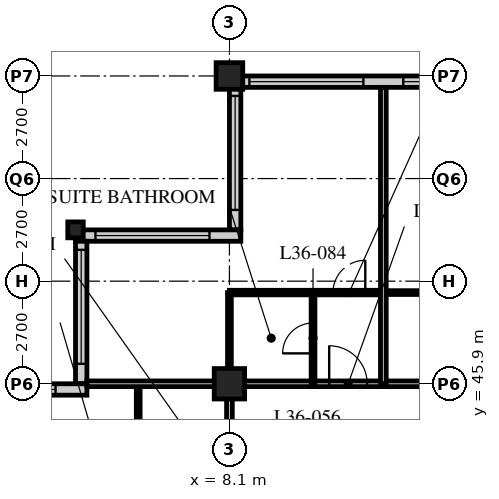
"""IFC4 building model, lengths in metres.
Left out: names, types, materials, properties, quantities, classifications, styles, units other than length and angle.
Written with IfcOpenShell. Run it as: python <this file> out.ifc"""

import sys

from ifc_helpers import new_model, si_unit, direction, frame, frame_2d, origin, origin_2d, place, context, subcontext, project, spatial, rectangle, hollow_rectangle, i_section, extrude, element, fill, save


model = new_model("IFC4")
c1 = context("Model", 3, precision=1e-05, world=origin(), true_north=direction((0.0, 1.0)))
c2 = subcontext(c1, "Body", "Model", "MODEL_VIEW")
j1 = project(units=[si_unit("LENGTHUNIT", "METRE"), si_unit("PLANEANGLEUNIT", "RADIAN")], contexts=[c1])
p1 = place(None, origin())
s1 = spatial("IfcSite", under=j1, at=p1, CompositionType="ELEMENT")
p2 = place(p1, origin())
s2 = spatial("IfcBuilding", under=s1, at=p2, CompositionType="ELEMENT")
p3 = place(p2, frame((0.0, 0.0, 140.8)))
s3 = spatial("IfcBuildingStorey", under=s2, at=p3, CompositionType="ELEMENT", Elevation=140.8)
p4 = place(p3, frame((4.05, 49.95, 0.0), z_axis=(0.0, 0.0, 1.0), x_axis=(1.0, 0.0, 0.0)))
e1 = element("IfcColumn", 1, at=p4, inside=s3, PredefinedType="COLUMN", context=c2, shape_type="SweptSolid", body=[
    extrude(i_section(OverallWidth=0.407, OverallDepth=0.419, WebThickness=0.031, FlangeThickness=0.049, FilletRadius=0.015, at=origin_2d()), origin(), (0.0, 0.0, 1.0), 3.4),
])
p5 = place(p3, frame((8.1, 45.9, 0.0), z_axis=(0.0, 0.0, 1.0), x_axis=(1.0, 0.0, 0.0)))
e2 = element("IfcColumn", 2, at=p5, inside=s3, PredefinedType="COLUMN", context=c2, shape_type="SweptSolid", body=[
    extrude(hollow_rectangle(XDim=0.8, YDim=0.8, WallThickness=0.08, at=origin_2d()), origin(), (0.0, 0.0, 1.0), 3.4),
])
p6 = place(p3, frame((8.1, 54.0, 0.0), z_axis=(0.0, 0.0, 1.0), x_axis=(1.0, 0.0, 0.0)))
e3 = element("IfcColumn", 3, at=p6, inside=s3, PredefinedType="COLUMN", context=c2, shape_type="SweptSolid", body=[
    extrude(hollow_rectangle(XDim=0.7, YDim=0.7, WallThickness=0.07, at=origin_2d()), origin(), (0.0, 0.0, 1.0), 3.4),
])
p7 = place(p3, frame((48.3, 53.85, 0.0), z_axis=(0.0, 0.0, 1.0), x_axis=(-1.0, 0.0, 0.0)))
e4 = element("IfcWall", 4, at=p7, inside=s3, PredefinedType="SOLIDWALL", context=c2, shape_type="SweptSolid", body=[
    extrude(rectangle(XDim=40.2, YDim=0.3, at=frame_2d((20.1, 0.0))), origin(), (0.0, 0.0, 1.0), 3.19),
])
p8 = place(p7, frame((0.225, 0.0, 0.9)))
e5 = element("IfcOpeningElement", 5, at=p8, cuts=e4, PredefinedType="OPENING", context=c2, shape_type="SweptSolid", body=[
    extrude(rectangle(XDim=3.0, YDim=2.0, at=frame_2d((1.5, 1.0))), frame((0.0, 0.16, 0.0), z_axis=(0.0, -1.0, 0.0), x_axis=(1.0, 0.0, 0.0)), (0.0, 0.0, 1.0), 0.32),
])
p9 = place(p7, frame((4.275, 0.0, 0.9)))
e6 = element("IfcOpeningElement", 6, at=p9, cuts=e4, PredefinedType="OPENING", context=c2, shape_type="SweptSolid", body=[
    extrude(rectangle(XDim=3.0, YDim=2.0, at=frame_2d((1.5, 1.0))), frame((0.0, 0.16, 0.0), z_axis=(0.0, -1.0, 0.0), x_axis=(1.0, 0.0, 0.0)), (0.0, 0.0, 1.0), 0.32),
])
p10 = place(p7, frame((8.325, 0.0, 0.9)))
e7 = element("IfcOpeningElement", 7, at=p10, cuts=e4, PredefinedType="OPENING", context=c2, shape_type="SweptSolid", body=[
    extrude(rectangle(XDim=3.0, YDim=2.0, at=frame_2d((1.5, 1.0))), frame((0.0, 0.16, 0.0), z_axis=(0.0, -1.0, 0.0), x_axis=(1.0, 0.0, 0.0)), (0.0, 0.0, 1.0), 0.32),
])
p11 = place(p7, frame((12.375, 0.0, 0.9)))
e8 = element("IfcOpeningElement", 8, at=p11, cuts=e4, PredefinedType="OPENING", context=c2, shape_type="SweptSolid", body=[
    extrude(rectangle(XDim=3.0, YDim=2.0, at=frame_2d((1.5, 1.0))), frame((0.0, 0.16, 0.0), z_axis=(0.0, -1.0, 0.0), x_axis=(1.0, 0.0, 0.0)), (0.0, 0.0, 1.0), 0.32),
])
p12 = place(p7, frame((16.425, 0.0, 0.9)))
e9 = element("IfcOpeningElement", 9, at=p12, cuts=e4, PredefinedType="OPENING", context=c2, shape_type="SweptSolid", body=[
    extrude(rectangle(XDim=3.0, YDim=2.0, at=frame_2d((1.5, 1.0))), frame((0.0, 0.16, 0.0), z_axis=(0.0, -1.0, 0.0), x_axis=(1.0, 0.0, 0.0)), (0.0, 0.0, 1.0), 0.32),
])
p13 = place(p7, frame((20.475, 0.0, 0.9)))
e10 = element("IfcOpeningElement", 10, at=p13, cuts=e4, PredefinedType="OPENING", context=c2, shape_type="SweptSolid", body=[
    extrude(rectangle(XDim=3.0, YDim=2.0, at=frame_2d((1.5, 1.0))), frame((0.0, 0.16, 0.0), z_axis=(0.0, -1.0, 0.0), x_axis=(1.0, 0.0, 0.0)), (0.0, 0.0, 1.0), 0.32),
])
p14 = place(p7, frame((24.525, 0.0, 0.9)))
e11 = element("IfcOpeningElement", 11, at=p14, cuts=e4, PredefinedType="OPENING", context=c2, shape_type="SweptSolid", body=[
    extrude(rectangle(XDim=3.0, YDim=2.0, at=frame_2d((1.5, 1.0))), frame((0.0, 0.16, 0.0), z_axis=(0.0, -1.0, 0.0), x_axis=(1.0, 0.0, 0.0)), (0.0, 0.0, 1.0), 0.32),
])
p15 = place(p7, frame((28.575, 0.0, 0.9)))
e12 = element("IfcOpeningElement", 12, at=p15, cuts=e4, PredefinedType="OPENING", context=c2, shape_type="SweptSolid", body=[
    extrude(rectangle(XDim=3.0, YDim=2.0, at=frame_2d((1.5, 1.0))), frame((0.0, 0.16, 0.0), z_axis=(0.0, -1.0, 0.0), x_axis=(1.0, 0.0, 0.0)), (0.0, 0.0, 1.0), 0.32),
])
p16 = place(p7, frame((32.625, 0.0, 0.9)))
e13 = element("IfcOpeningElement", 13, at=p16, cuts=e4, PredefinedType="OPENING", context=c2, shape_type="SweptSolid", body=[
    extrude(rectangle(XDim=3.0, YDim=2.0, at=frame_2d((1.5, 1.0))), frame((0.0, 0.16, 0.0), z_axis=(0.0, -1.0, 0.0), x_axis=(1.0, 0.0, 0.0)), (0.0, 0.0, 1.0), 0.32),
])
p17 = place(p7, frame((36.675, 0.0, 0.9)))
e14 = element("IfcOpeningElement", 14, at=p17, cuts=e4, PredefinedType="OPENING", context=c2, shape_type="SweptSolid", body=[
    extrude(rectangle(XDim=3.0, YDim=2.0, at=frame_2d((1.5, 1.0))), frame((0.0, 0.16, 0.0), z_axis=(0.0, -1.0, 0.0), x_axis=(1.0, 0.0, 0.0)), (0.0, 0.0, 1.0), 0.32),
])
p18 = place(p3, frame((8.25, 53.7, 0.0), z_axis=(0.0, 0.0, 1.0), x_axis=(0.0, -1.0, 0.0)))
e15 = element("IfcWall", 15, at=p18, inside=s3, PredefinedType="SOLIDWALL", context=c2, shape_type="SweptSolid", body=[
    extrude(rectangle(XDim=3.75, YDim=0.3, at=frame_2d((1.875, 0.0))), origin(), (0.0, 0.0, 1.0), 3.19),
])
p19 = place(p18, frame((0.225, 0.0, 0.9)))
e16 = element("IfcOpeningElement", 16, at=p19, cuts=e15, PredefinedType="OPENING", context=c2, shape_type="SweptSolid", body=[
    extrude(rectangle(XDim=3.0, YDim=1.5, at=frame_2d((1.5, 0.75))), frame((0.0, 0.16, 0.0), z_axis=(0.0, -1.0, 0.0), x_axis=(1.0, 0.0, 0.0)), (0.0, 0.0, 1.0), 0.32),
])
p20 = place(p3, frame((8.4, 49.8, 0.0), z_axis=(0.0, 0.0, 1.0), x_axis=(-1.0, 0.0, 0.0)))
e17 = element("IfcWall", 17, at=p20, inside=s3, PredefinedType="SOLIDWALL", context=c2, shape_type="SweptSolid", body=[
    extrude(rectangle(XDim=4.35, YDim=0.3, at=frame_2d((2.175, 0.0))), origin(), (0.0, 0.0, 1.0), 3.19),
])
p21 = place(p20, frame((0.825, 0.0, 0.9)))
e18 = element("IfcOpeningElement", 18, at=p21, cuts=e17, PredefinedType="OPENING", context=c2, shape_type="SweptSolid", body=[
    extrude(rectangle(XDim=3.0, YDim=1.5, at=frame_2d((1.5, 0.75))), frame((0.0, 0.16, 0.0), z_axis=(0.0, -1.0, 0.0), x_axis=(1.0, 0.0, 0.0)), (0.0, 0.0, 1.0), 0.32),
])
p22 = place(p3, frame((4.2, 49.65, 0.0), z_axis=(0.0, 0.0, 1.0), x_axis=(0.0, -1.0, 0.0)))
e19 = element("IfcWall", 19, at=p22, inside=s3, PredefinedType="SOLIDWALL", context=c2, shape_type="SweptSolid", body=[
    extrude(rectangle(XDim=3.75, YDim=0.3, at=frame_2d((1.875, 0.0))), origin(), (0.0, 0.0, 1.0), 3.19),
])
p23 = place(p22, frame((0.225, 0.0, 0.9)))
e20 = element("IfcOpeningElement", 20, at=p23, cuts=e19, PredefinedType="OPENING", context=c2, shape_type="SweptSolid", body=[
    extrude(rectangle(XDim=3.0, YDim=1.5, at=frame_2d((1.5, 0.75))), frame((0.0, 0.16, 0.0), z_axis=(0.0, -1.0, 0.0), x_axis=(1.0, 0.0, 0.0)), (0.0, 0.0, 1.0), 0.32),
])
p24 = place(p3, frame((4.35, 45.75, 0.0), z_axis=(0.0, 0.0, 1.0), x_axis=(-1.0, 0.0, 0.0)))
e21 = element("IfcWall", 21, at=p24, inside=s3, PredefinedType="SOLIDWALL", context=c2, shape_type="SweptSolid", body=[
    extrude(rectangle(XDim=4.35, YDim=0.3, at=frame_2d((2.175, 0.0))), origin(), (0.0, 0.0, 1.0), 3.19),
])
p25 = place(p24, frame((0.825, 0.0, 0.9)))
e22 = element("IfcOpeningElement", 22, at=p25, cuts=e21, PredefinedType="OPENING", context=c2, shape_type="SweptSolid", body=[
    extrude(rectangle(XDim=3.0, YDim=1.5, at=frame_2d((1.5, 0.75))), frame((0.0, 0.16, 0.0), z_axis=(0.0, -1.0, 0.0), x_axis=(1.0, 0.0, 0.0)), (0.0, 0.0, 1.0), 0.32),
])
p26 = place(p3, frame((8.1, 45.9, 0.0), z_axis=(0.0, 0.0, 1.0), x_axis=(1.0, 0.0, 0.0)))
e23 = element("IfcWall", 23, at=p26, inside=s3, PredefinedType="PARTITIONING", context=c2, shape_type="SweptSolid", body=[
    extrude(rectangle(XDim=36.45, YDim=0.15, at=frame_2d((18.225, 0.0))), origin(), (0.0, 0.0, 1.0), 2.578),
])
p27 = place(p26, frame((9.625, 0.0, 0.0)))
e24 = element("IfcOpeningElement", 24, at=p27, cuts=e23, PredefinedType="OPENING", context=c2, shape_type="SweptSolid", body=[
    extrude(rectangle(XDim=1.0, YDim=2.1, at=frame_2d((0.5, 1.05))), frame((0.0, 0.085, 0.0), z_axis=(0.0, -1.0, 0.0), x_axis=(1.0, 0.0, 0.0)), (0.0, 0.0, 1.0), 0.17),
])
p28 = place(p26, frame((21.775, 0.0, 0.0)))
e25 = element("IfcOpeningElement", 25, at=p28, cuts=e23, PredefinedType="OPENING", context=c2, shape_type="SweptSolid", body=[
    extrude(rectangle(XDim=1.0, YDim=2.1, at=frame_2d((0.5, 1.05))), frame((0.0, 0.085, 0.0), z_axis=(0.0, -1.0, 0.0), x_axis=(1.0, 0.0, 0.0)), (0.0, 0.0, 1.0), 0.17),
])
p29 = place(p26, frame((28.95, 0.0, 0.0)))
e26 = element("IfcOpeningElement", 26, at=p29, cuts=e23, PredefinedType="OPENING", context=c2, shape_type="SweptSolid", body=[
    extrude(rectangle(XDim=1.0, YDim=2.1, at=frame_2d((0.5, 1.05))), frame((0.0, 0.085, 0.0), z_axis=(0.0, -1.0, 0.0), x_axis=(1.0, 0.0, 0.0)), (0.0, 0.0, 1.0), 0.17),
])
p30 = place(p26, frame((33.925, 0.0, 0.0)))
e27 = element("IfcOpeningElement", 27, at=p30, cuts=e23, PredefinedType="OPENING", context=c2, shape_type="SweptSolid", body=[
    extrude(rectangle(XDim=1.0, YDim=2.1, at=frame_2d((0.5, 1.05))), frame((0.0, 0.085, 0.0), z_axis=(0.0, -1.0, 0.0), x_axis=(1.0, 0.0, 0.0)), (0.0, 0.0, 1.0), 0.17),
])
p31 = place(p26, frame((2.625, 0.0, 0.0)))
e28 = element("IfcOpeningElement", 28, at=p31, cuts=e23, PredefinedType="OPENING", context=c2, shape_type="SweptSolid", body=[
    extrude(rectangle(XDim=1.0, YDim=2.1, at=frame_2d((0.5, 1.05))), frame((0.0, 0.085, 0.0), z_axis=(0.0, -1.0, 0.0), x_axis=(1.0, 0.0, 0.0)), (0.0, 0.0, 1.0), 0.17),
])
p32 = place(p3, frame((8.1, 17.55, 0.0), z_axis=(0.0, 0.0, 1.0), x_axis=(0.0, 1.0, 0.0)))
e29 = element("IfcWall", 29, at=p32, inside=s3, PredefinedType="PARTITIONING", context=c2, shape_type="SweptSolid", body=[
    extrude(rectangle(XDim=28.35, YDim=0.15, at=frame_2d((14.175, 0.0))), origin(), (0.0, 0.0, 1.0), 2.578),
])
p33 = place(p32, frame((1.9, 0.0, 0.0)))
e30 = element("IfcOpeningElement", 30, at=p33, cuts=e29, PredefinedType="OPENING", context=c2, shape_type="SweptSolid", body=[
    extrude(rectangle(XDim=1.0, YDim=2.1, at=frame_2d((0.5, 1.05))), frame((0.0, 0.085, 0.0), z_axis=(0.0, -1.0, 0.0), x_axis=(1.0, 0.0, 0.0)), (0.0, 0.0, 1.0), 0.17),
])
p34 = place(p32, frame((10.0, 0.0, 0.0)))
e31 = element("IfcOpeningElement", 31, at=p34, cuts=e29, PredefinedType="OPENING", context=c2, shape_type="SweptSolid", body=[
    extrude(rectangle(XDim=1.0, YDim=2.1, at=frame_2d((0.5, 1.05))), frame((0.0, 0.085, 0.0), z_axis=(0.0, -1.0, 0.0), x_axis=(1.0, 0.0, 0.0)), (0.0, 0.0, 1.0), 0.17),
])
p35 = place(p32, frame((18.1, 0.0, 0.0)))
e32 = element("IfcOpeningElement", 32, at=p35, cuts=e29, PredefinedType="OPENING", context=c2, shape_type="SweptSolid", body=[
    extrude(rectangle(XDim=1.0, YDim=2.1, at=frame_2d((0.5, 1.05))), frame((0.0, 0.085, 0.0), z_axis=(0.0, -1.0, 0.0), x_axis=(1.0, 0.0, 0.0)), (0.0, 0.0, 1.0), 0.17),
])
p36 = place(p32, frame((24.9, 0.0, 0.0)))
e33 = element("IfcOpeningElement", 33, at=p36, cuts=e29, PredefinedType="OPENING", context=c2, shape_type="SweptSolid", body=[
    extrude(rectangle(XDim=1.0, YDim=2.1, at=frame_2d((0.5, 1.05))), frame((0.0, 0.085, 0.0), z_axis=(0.0, -1.0, 0.0), x_axis=(1.0, 0.0, 0.0)), (0.0, 0.0, 1.0), 0.17),
])
p37 = place(p3, frame((12.15, 48.3, 0.0), z_axis=(0.0, 0.0, 1.0), x_axis=(1.0, 0.0, 0.0)))
e34 = element("IfcWall", 34, at=p37, inside=s3, PredefinedType="PARTITIONING", context=c2, shape_type="SweptSolid", body=[
    extrude(rectangle(XDim=2.6, YDim=0.1, at=frame_2d((1.3, 0.0))), origin(), (0.0, 0.0, 1.0), 3.19),
])
p38 = place(p3, frame((5.7, 43.6, 0.0), z_axis=(0.0, 0.0, 1.0), x_axis=(0.0, 1.0, 0.0)))
e35 = element("IfcWall", 35, at=p38, inside=s3, PredefinedType="PARTITIONING", context=c2, shape_type="SweptSolid", body=[
    extrude(rectangle(XDim=2.3, YDim=0.1, at=frame_2d((1.15, 0.0))), origin(), (0.0, 0.0, 1.0), 3.19),
])
p39 = place(p3, frame((8.1, 48.3, 0.0), z_axis=(0.0, 0.0, 1.0), x_axis=(1.0, 0.0, 0.0)))
e36 = element("IfcWall", 36, at=p39, inside=s3, PredefinedType="PARTITIONING", context=c2, shape_type="SweptSolid", body=[
    extrude(rectangle(XDim=4.05, YDim=0.12, at=frame_2d((2.025, 0.0))), origin(), (0.0, 0.0, 1.0), 3.19),
])
p40 = place(p39, frame((2.725, 0.0, 0.0)))
e37 = element("IfcOpeningElement", 37, at=p40, cuts=e36, PredefinedType="OPENING", context=c2, shape_type="SweptSolid", body=[
    extrude(rectangle(XDim=0.85, YDim=2.1, at=frame_2d((0.425, 1.05))), frame((0.0, 0.07, 0.0), z_axis=(0.0, -1.0, 0.0), x_axis=(1.0, 0.0, 0.0)), (0.0, 0.0, 1.0), 0.14),
])
p41 = place(p3, frame((10.3, 45.9, 0.0), z_axis=(0.0, 0.0, 1.0), x_axis=(0.0, 1.0, 0.0)))
e38 = element("IfcWall", 38, at=p41, inside=s3, PredefinedType="PARTITIONING", context=c2, shape_type="SweptSolid", body=[
    extrude(rectangle(XDim=2.4, YDim=0.1, at=frame_2d((1.2, 0.0))), origin(), (0.0, 0.0, 1.0), 3.19),
])
p42 = place(p41, frame((0.8, 0.0, 0.0)))
e39 = element("IfcOpeningElement", 39, at=p42, cuts=e38, PredefinedType="OPENING", context=c2, shape_type="SweptSolid", body=[
    extrude(rectangle(XDim=0.8, YDim=2.1, at=frame_2d((0.4, 1.05))), frame((0.0, 0.06, 0.0), z_axis=(0.0, -1.0, 0.0), x_axis=(1.0, 0.0, 0.0)), (0.0, 0.0, 1.0), 0.12),
])
p43 = place(p3, frame((8.1, 45.9, 0.0), z_axis=(0.0, 0.0, 1.0), x_axis=(0.0, 1.0, 0.0)))
e40 = element("IfcWall", 40, at=p43, inside=s3, PredefinedType="PARTITIONING", context=c2, shape_type="SweptSolid", body=[
    extrude(rectangle(XDim=2.4, YDim=0.1, at=frame_2d((1.2, 0.0))), origin(), (0.0, 0.0, 1.0), 2.578),
])
p44 = place(p3, frame((4.35, 45.9, 0.0), z_axis=(0.0, 0.0, 1.0), x_axis=(1.0, 0.0, 0.0)))
e41 = element("IfcWall", 41, at=p44, inside=s3, PredefinedType="PARTITIONING", context=c2, shape_type="SweptSolid", body=[
    extrude(rectangle(XDim=3.75, YDim=0.15, at=frame_2d((1.875, 0.0))), origin(), (0.0, 0.0, 1.0), 2.578),
])
p45 = place(p3, frame((12.15, 45.9, 0.0), z_axis=(0.0, 0.0, 1.0), x_axis=(0.0, 1.0, 0.0)))
e42 = element("IfcWall", 42, at=p45, inside=s3, PredefinedType="PARTITIONING", context=c2, shape_type="SweptSolid", body=[
    extrude(rectangle(XDim=7.8, YDim=0.15, at=frame_2d((3.9, 0.0))), origin(), (0.0, 0.0, 1.0), 3.19),
])
p46 = place(p16, origin())
e43 = element("IfcWindow", 43, at=p46, inside=s3, PartitioningType="SINGLE_PANEL", PredefinedType="WINDOW", context=c2, shape_type="SweptSolid", body=[
    extrude(rectangle(XDim=3.0, YDim=2.0, at=frame_2d((1.5, 1.0))), frame((0.0, 0.03, 0.0), z_axis=(0.0, -1.0, 0.0), x_axis=(1.0, 0.0, 0.0)), (0.0, 0.0, 1.0), 0.06),
])
fill(e13, e43)
p47 = place(p17, origin())
e44 = element("IfcWindow", 44, at=p47, inside=s3, PartitioningType="SINGLE_PANEL", PredefinedType="WINDOW", context=c2, shape_type="SweptSolid", body=[
    extrude(rectangle(XDim=3.0, YDim=2.0, at=frame_2d((1.5, 1.0))), frame((0.0, 0.03, 0.0), z_axis=(0.0, -1.0, 0.0), x_axis=(1.0, 0.0, 0.0)), (0.0, 0.0, 1.0), 0.06),
])
fill(e14, e44)
p48 = place(p19, origin())
e45 = element("IfcWindow", 45, at=p48, inside=s3, PartitioningType="SINGLE_PANEL", PredefinedType="WINDOW", context=c2, shape_type="SweptSolid", body=[
    extrude(rectangle(XDim=3.0, YDim=1.5, at=frame_2d((1.5, 0.75))), frame((0.0, 0.03, 0.0), z_axis=(0.0, -1.0, 0.0), x_axis=(1.0, 0.0, 0.0)), (0.0, 0.0, 1.0), 0.06),
])
fill(e16, e45)
p49 = place(p21, origin())
e46 = element("IfcWindow", 46, at=p49, inside=s3, PartitioningType="SINGLE_PANEL", PredefinedType="WINDOW", context=c2, shape_type="SweptSolid", body=[
    extrude(rectangle(XDim=3.0, YDim=1.5, at=frame_2d((1.5, 0.75))), frame((0.0, 0.03, 0.0), z_axis=(0.0, -1.0, 0.0), x_axis=(1.0, 0.0, 0.0)), (0.0, 0.0, 1.0), 0.06),
])
fill(e18, e46)
p50 = place(p23, origin())
e47 = element("IfcWindow", 47, at=p50, inside=s3, PartitioningType="SINGLE_PANEL", PredefinedType="WINDOW", context=c2, shape_type="SweptSolid", body=[
    extrude(rectangle(XDim=3.0, YDim=1.5, at=frame_2d((1.5, 0.75))), frame((0.0, 0.03, 0.0), z_axis=(0.0, -1.0, 0.0), x_axis=(1.0, 0.0, 0.0)), (0.0, 0.0, 1.0), 0.06),
])
fill(e20, e47)
p51 = place(p25, origin())
e48 = element("IfcWindow", 48, at=p51, inside=s3, PartitioningType="SINGLE_PANEL", PredefinedType="WINDOW", context=c2, shape_type="SweptSolid", body=[
    extrude(rectangle(XDim=3.0, YDim=1.5, at=frame_2d((1.5, 0.75))), frame((0.0, 0.03, 0.0), z_axis=(0.0, -1.0, 0.0), x_axis=(1.0, 0.0, 0.0)), (0.0, 0.0, 1.0), 0.06),
])
fill(e22, e48)
p52 = place(p42, origin())
e49 = element("IfcDoor", 49, at=p52, inside=s3, OperationType="SINGLE_SWING_LEFT", PredefinedType="DOOR", context=c2, shape_type="SweptSolid", body=[
    extrude(rectangle(XDim=0.8, YDim=2.1, at=frame_2d((0.4, 1.05))), frame((0.0, 0.025, 0.0), z_axis=(0.0, -1.0, 0.0), x_axis=(1.0, 0.0, 0.0)), (0.0, 0.0, 1.0), 0.05),
])
fill(e39, e49)
p53 = place(p31, origin())
e50 = element("IfcDoor", 50, at=p53, inside=s3, OperationType="SINGLE_SWING_LEFT", PredefinedType="DOOR", context=c2, shape_type="SweptSolid", body=[
    extrude(rectangle(XDim=1.0, YDim=2.1, at=frame_2d((0.5, 1.05))), frame((0.0, 0.025, 0.0), z_axis=(0.0, -1.0, 0.0), x_axis=(1.0, 0.0, 0.0)), (0.0, 0.0, 1.0), 0.05),
])
fill(e28, e50)
p54 = place(p40, origin())
e51 = element("IfcDoor", 51, at=p54, inside=s3, OperationType="SINGLE_SWING_RIGHT", PredefinedType="DOOR", context=c2, shape_type="SweptSolid", body=[
    extrude(rectangle(XDim=0.85, YDim=2.1, at=frame_2d((0.425, 1.05))), frame((0.0, 0.025, 0.0), z_axis=(0.0, -1.0, 0.0), x_axis=(1.0, 0.0, 0.0)), (0.0, 0.0, 1.0), 0.05),
])
fill(e37, e51)
save(model, sys.argv[1])
